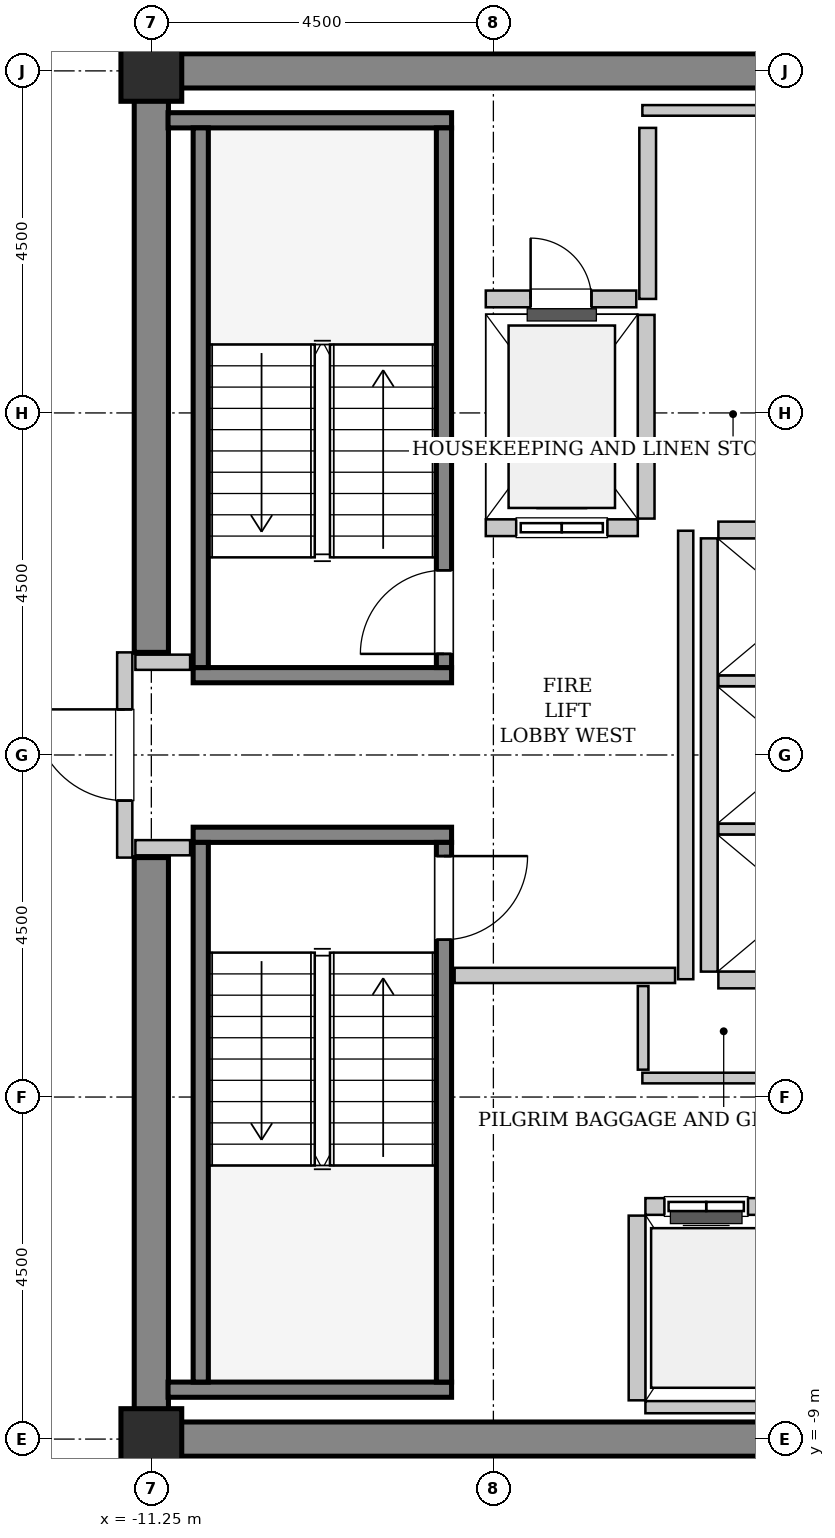
"""IFC4 building model, lengths in metres.
Left out: names, types, materials, properties, quantities, classifications, styles, units other than length and angle.
Written with IfcOpenShell. Run it as: python <this file> out.ifc"""

import sys

from ifc_helpers import new_model, si_unit, direction, frame, frame_2d, origin, origin_2d, place, context, subcontext, project, spatial, rectangle, hollow_rectangle, extrude, source, transform, mapped, element, fill, save


model = new_model("IFC4")
c1 = context("Model", 3, precision=1e-05, world=origin(), true_north=direction((0.0, 1.0)))
c2 = subcontext(c1, "Body", "Model", "MODEL_VIEW")
j1 = project(units=[si_unit("LENGTHUNIT", "METRE"), si_unit("PLANEANGLEUNIT", "RADIAN")], contexts=[c1])
p1 = place(None, origin())
s1 = spatial("IfcSite", under=j1, at=p1, CompositionType="ELEMENT")
p2 = place(p1, origin())
s2 = spatial("IfcBuilding", under=s1, at=p2, CompositionType="ELEMENT")
p3 = place(p2, frame((0.0, 0.0, 244.6)))
s3 = spatial("IfcBuildingStorey", under=s2, at=p3, CompositionType="ELEMENT", Elevation=244.6)
m1 = source(origin(), c2, "Body", "SweptSolid", [
    extrude(rectangle(XDim=9.925, YDim=0.45, at=frame_2d((4.962, 0.0))), origin(), (0.0, 0.0, 1.0), 3.8),
])
for number, where, z_axis, x_axis in (
    (1, (-11.475, 9.0, 0.0), (0.0, 0.0, 1.0), (1.0, 0.0, 0.0)),
    (2, (-11.475, -9.0, 0.0), (0.0, 0.0, 1.0), (1.0, 0.0, 0.0)),
):
    element("IfcWall", number, at=place(p3, frame(where, z_axis=z_axis, x_axis=x_axis)), inside=s3, PredefinedType="SHEAR", context=c2, shape_type="MappedRepresentation", body=[
        mapped(m1, transform((0.0, 0.0, 0.0), x_axis=(1.0, 0.0, 0.0), y_axis=(0.0, 1.0, 0.0), z_axis=(0.0, 0.0, 1.0), scale=1.0)),
    ])
m2 = source(origin(), c2, "Body", "SweptSolid", [
    extrude(rectangle(XDim=7.425, YDim=0.45, at=frame_2d((3.712, 0.0))), origin(), (0.0, 0.0, 1.0), 3.8),
])
for number, where, z_axis, x_axis in (
    (3, (-11.25, -8.775, 0.0), (0.0, 0.0, 1.0), (0.0, 1.0, 0.0)),
    (4, (-11.25, 1.35, 0.0), (0.0, 0.0, 1.0), (0.0, 1.0, 0.0)),
):
    element("IfcWall", number, at=place(p3, frame(where, z_axis=z_axis, x_axis=x_axis)), inside=s3, PredefinedType="SHEAR", context=c2, shape_type="MappedRepresentation", body=[
        mapped(m2, transform((0.0, 0.0, 0.0), x_axis=(1.0, 0.0, 0.0), y_axis=(0.0, 1.0, 0.0), z_axis=(0.0, 0.0, 1.0), scale=1.0)),
    ])
m3 = source(origin(), c2, "Body", "SweptSolid", [
    extrude(hollow_rectangle(XDim=0.8, YDim=0.8, WallThickness=0.04, InnerFilletRadius=0.04, OuterFilletRadius=0.08, at=origin_2d()), origin(), (0.0, 0.0, 1.0), 3.8),
])
for number, where, z_axis, x_axis in (
    (5, (-11.25, -9.0, 0.0), (0.0, 0.0, 1.0), (1.0, 0.0, 0.0)),
    (6, (-11.25, 9.0, 0.0), (0.0, 0.0, 1.0), (1.0, 0.0, 0.0)),
):
    element("IfcColumn", number, at=place(p3, frame(where, z_axis=z_axis, x_axis=x_axis)), inside=s3, PredefinedType="COLUMN", context=c2, shape_type="MappedRepresentation", body=[
        mapped(m3, transform((0.0, 0.0, 0.0), x_axis=(1.0, 0.0, 0.0), y_axis=(0.0, 1.0, 0.0), z_axis=(0.0, 0.0, 1.0), scale=1.0)),
    ])
m4 = source(origin(), c2, "Body", "SweptSolid", [
    extrude(rectangle(XDim=3.4, YDim=0.2, at=frame_2d((1.7, 0.0))), origin(), (0.0, 0.0, 1.0), 3.8),
])
p4 = place(p3, frame((-7.3, 1.05, 0.0), z_axis=(0.0, 0.0, 1.0), x_axis=(-1.0, 0.0, 0.0)))
e7 = element("IfcWall", 7, at=p4, inside=s3, PredefinedType="SOLIDWALL", context=c2, shape_type="MappedRepresentation", body=[
    mapped(m4, transform((0.0, 0.0, 0.0), x_axis=(1.0, 0.0, 0.0), y_axis=(0.0, 1.0, 0.0), z_axis=(0.0, 0.0, 1.0), scale=1.0)),
])
m5 = source(origin(), c2, "Body", "SweptSolid", [
    extrude(rectangle(XDim=3.73, YDim=0.2, at=frame_2d((1.865, 0.0))), origin(), (0.0, 0.0, 1.0), 3.8),
])
p5 = place(p3, frame((-7.3, 8.35, 0.0), z_axis=(0.0, 0.0, 1.0), x_axis=(-1.0, 0.0, 0.0)))
e8 = element("IfcWall", 8, at=p5, inside=s3, PredefinedType="SOLIDWALL", context=c2, shape_type="MappedRepresentation", body=[
    mapped(m5, transform((0.0, 0.0, 0.0), x_axis=(1.0, 0.0, 0.0), y_axis=(0.0, 1.0, 0.0), z_axis=(0.0, 0.0, 1.0), scale=1.0)),
])
m6 = source(origin(), c2, "Body", "SweptSolid", [
    extrude(rectangle(XDim=7.1, YDim=0.2, at=frame_2d((3.55, 0.0))), origin(), (0.0, 0.0, 1.0), 3.8),
])
p6 = place(p3, frame((-7.4, 1.15, 0.0), z_axis=(0.0, 0.0, 1.0), x_axis=(0.0, 1.0, 0.0)))
e9 = element("IfcWall", 9, at=p6, inside=s3, PredefinedType="SOLIDWALL", context=c2, shape_type="MappedRepresentation", body=[
    mapped(m6, transform((0.0, 0.0, 0.0), x_axis=(1.0, 0.0, 0.0), y_axis=(0.0, 1.0, 0.0), z_axis=(0.0, 0.0, 1.0), scale=1.0)),
])
p7 = place(p6, frame((0.18, 0.0, 0.0)))
e10 = element("IfcOpeningElement", 10, at=p7, cuts=e9, PredefinedType="OPENING", context=c2, shape_type="SweptSolid", body=[
    extrude(rectangle(XDim=1.1, YDim=2.15, at=frame_2d((0.55, 1.075))), frame((0.0, 0.11, 0.0), z_axis=(0.0, -1.0, 0.0), x_axis=(1.0, 0.0, 0.0)), (0.0, 0.0, 1.0), 0.22),
])
p8 = place(p3, frame((-10.6, 1.15, 0.0), z_axis=(0.0, 0.0, 1.0), x_axis=(0.0, 1.0, 0.0)))
e11 = element("IfcWall", 11, at=p8, inside=s3, PredefinedType="SOLIDWALL", context=c2, shape_type="MappedRepresentation", body=[
    mapped(m6, transform((0.0, 0.0, 0.0), x_axis=(1.0, 0.0, 0.0), y_axis=(0.0, 1.0, 0.0), z_axis=(0.0, 0.0, 1.0), scale=1.0)),
])
p9 = place(p3, frame((-10.7, -1.05, 0.0), z_axis=(0.0, 0.0, 1.0), x_axis=(1.0, 0.0, 0.0)))
e12 = element("IfcWall", 12, at=p9, inside=s3, PredefinedType="SOLIDWALL", context=c2, shape_type="MappedRepresentation", body=[
    mapped(m4, transform((0.0, 0.0, 0.0), x_axis=(1.0, 0.0, 0.0), y_axis=(0.0, 1.0, 0.0), z_axis=(0.0, 0.0, 1.0), scale=1.0)),
])
p10 = place(p3, frame((-11.03, -8.35, 0.0), z_axis=(0.0, 0.0, 1.0), x_axis=(1.0, 0.0, 0.0)))
e13 = element("IfcWall", 13, at=p10, inside=s3, PredefinedType="SOLIDWALL", context=c2, shape_type="MappedRepresentation", body=[
    mapped(m5, transform((0.0, 0.0, 0.0), x_axis=(1.0, 0.0, 0.0), y_axis=(0.0, 1.0, 0.0), z_axis=(0.0, 0.0, 1.0), scale=1.0)),
])
p11 = place(p3, frame((-10.6, -1.15, 0.0), z_axis=(0.0, 0.0, 1.0), x_axis=(0.0, -1.0, 0.0)))
e14 = element("IfcWall", 14, at=p11, inside=s3, PredefinedType="SOLIDWALL", context=c2, shape_type="MappedRepresentation", body=[
    mapped(m6, transform((0.0, 0.0, 0.0), x_axis=(1.0, 0.0, 0.0), y_axis=(0.0, 1.0, 0.0), z_axis=(0.0, 0.0, 1.0), scale=1.0)),
])
p12 = place(p3, frame((-7.4, -1.15, 0.0), z_axis=(0.0, 0.0, 1.0), x_axis=(0.0, -1.0, 0.0)))
e15 = element("IfcWall", 15, at=p12, inside=s3, PredefinedType="SOLIDWALL", context=c2, shape_type="MappedRepresentation", body=[
    mapped(m6, transform((0.0, 0.0, 0.0), x_axis=(1.0, 0.0, 0.0), y_axis=(0.0, 1.0, 0.0), z_axis=(0.0, 0.0, 1.0), scale=1.0)),
])
p13 = place(p12, frame((0.18, 0.0, 0.0)))
e16 = element("IfcOpeningElement", 16, at=p13, cuts=e15, PredefinedType="OPENING", context=c2, shape_type="SweptSolid", body=[
    extrude(rectangle(XDim=1.1, YDim=2.15, at=frame_2d((0.55, 1.075))), frame((0.0, 0.11, 0.0), z_axis=(0.0, -1.0, 0.0), x_axis=(1.0, 0.0, 0.0)), (0.0, 0.0, 1.0), 0.22),
])
m7 = source(origin(), c2, "Body", "SweptSolid", [
    extrude(rectangle(XDim=2.0, YDim=0.22, at=frame_2d((1.0, 0.0))), origin(), (0.0, 0.0, 1.0), 3.535),
])
p14 = place(p3, frame((-6.85, 2.99, 0.0), z_axis=(0.0, 0.0, 1.0), x_axis=(1.0, 0.0, 0.0)))
e17 = element("IfcWall", 17, at=p14, inside=s3, PredefinedType="SOLIDWALL", context=c2, shape_type="MappedRepresentation", body=[
    mapped(m7, transform((0.0, 0.0, 0.0), x_axis=(1.0, 0.0, 0.0), y_axis=(0.0, 1.0, 0.0), z_axis=(0.0, 0.0, 1.0), scale=1.0)),
])
p15 = place(p14, frame((0.4, 0.0, 0.0)))
e18 = element("IfcOpeningElement", 18, at=p15, cuts=e17, PredefinedType="OPENING", context=c2, shape_type="SweptSolid", body=[
    extrude(rectangle(XDim=1.2, YDim=2.2, at=frame_2d((0.6, 1.1))), frame((0.0, 0.12, 0.0), z_axis=(0.0, -1.0, 0.0), x_axis=(1.0, 0.0, 0.0)), (0.0, 0.0, 1.0), 0.24),
])
m8 = source(origin(), c2, "Body", "SweptSolid", [
    extrude(rectangle(XDim=2.68, YDim=0.22, at=frame_2d((1.34, 0.0))), origin(), (0.0, 0.0, 1.0), 3.535),
])
p16 = place(p3, frame((-4.74, 3.11, 0.0), z_axis=(0.0, 0.0, 1.0), x_axis=(0.0, 1.0, 0.0)))
e19 = element("IfcWall", 19, at=p16, inside=s3, PredefinedType="SOLIDWALL", context=c2, shape_type="MappedRepresentation", body=[
    mapped(m8, transform((0.0, 0.0, 0.0), x_axis=(1.0, 0.0, 0.0), y_axis=(0.0, 1.0, 0.0), z_axis=(0.0, 0.0, 1.0), scale=1.0)),
])
m9 = source(origin(), c2, "Body", "SweptSolid", [
    extrude(rectangle(XDim=3.2, YDim=0.22, at=frame_2d((1.6, 0.0))), origin(), (0.0, 0.0, 1.0), 3.535),
])
p17 = place(p3, frame((-1.55, -5.94, 0.0), z_axis=(0.0, 0.0, 1.0), x_axis=(-1.0, 0.0, 0.0)))
e20 = element("IfcWall", 20, at=p17, inside=s3, PredefinedType="SOLIDWALL", context=c2, shape_type="MappedRepresentation", body=[
    mapped(m9, transform((0.0, 0.0, 0.0), x_axis=(1.0, 0.0, 0.0), y_axis=(0.0, 1.0, 0.0), z_axis=(0.0, 0.0, 1.0), scale=1.0)),
])
p18 = place(p17, frame((1.85, 0.0, 0.0)))
e21 = element("IfcOpeningElement", 21, at=p18, cuts=e20, PredefinedType="OPENING", context=c2, shape_type="SweptSolid", body=[
    extrude(rectangle(XDim=1.1, YDim=2.2, at=frame_2d((0.55, 1.1))), frame((0.0, 0.12, 0.0), z_axis=(0.0, -1.0, 0.0), x_axis=(1.0, 0.0, 0.0)), (0.0, 0.0, 1.0), 0.24),
])
p19 = place(p17, frame((0.225, 0.0, 0.0)))
e22 = element("IfcOpeningElement", 22, at=p19, cuts=e20, PredefinedType="OPENING", context=c2, shape_type="SweptSolid", body=[
    extrude(rectangle(XDim=1.1, YDim=2.2, at=frame_2d((0.55, 1.1))), frame((0.0, 0.12, 0.0), z_axis=(0.0, -1.0, 0.0), x_axis=(1.0, 0.0, 0.0)), (0.0, 0.0, 1.0), 0.24),
])
m10 = source(origin(), c2, "Body", "SweptSolid", [
    extrude(rectangle(XDim=3.2, YDim=0.16, at=frame_2d((1.6, 0.0))), origin(), (0.0, 0.0, 1.0), 2.625),
])
p20 = place(p3, frame((-4.75, -8.58, 0.0), z_axis=(0.0, 0.0, 1.0), x_axis=(1.0, 0.0, 0.0)))
e23 = element("IfcWall", 23, at=p20, inside=s3, PredefinedType="PARTITIONING", context=c2, shape_type="MappedRepresentation", body=[
    mapped(m10, transform((0.0, 0.0, 0.0), x_axis=(1.0, 0.0, 0.0), y_axis=(0.0, 1.0, 0.0), z_axis=(0.0, 0.0, 1.0), scale=1.0)),
])
m11 = source(origin(), c2, "Body", "SweptSolid", [
    extrude(rectangle(XDim=2.43, YDim=0.22, at=frame_2d((1.215, 0.0))), origin(), (0.0, 0.0, 1.0), 3.535),
])
p21 = place(p3, frame((-4.86, -6.06, 0.0), z_axis=(0.0, 0.0, 1.0), x_axis=(0.0, -1.0, 0.0)))
e24 = element("IfcWall", 24, at=p21, inside=s3, PredefinedType="SOLIDWALL", context=c2, shape_type="MappedRepresentation", body=[
    mapped(m11, transform((0.0, 0.0, 0.0), x_axis=(1.0, 0.0, 0.0), y_axis=(0.0, 1.0, 0.0), z_axis=(0.0, 0.0, 1.0), scale=1.0)),
])
m12 = source(origin(), c2, "Body", "SweptSolid", [
    extrude(rectangle(XDim=5.7, YDim=0.22, at=frame_2d((2.85, 0.0))), origin(), (0.0, 0.0, 1.0), 3.535),
])
p22 = place(p3, frame((-3.91, 2.85, 0.0), z_axis=(0.0, 0.0, 1.0), x_axis=(0.0, -1.0, 0.0)))
e25 = element("IfcWall", 25, at=p22, inside=s3, PredefinedType="SOLIDWALL", context=c2, shape_type="MappedRepresentation", body=[
    mapped(m12, transform((0.0, 0.0, 0.0), x_axis=(1.0, 0.0, 0.0), y_axis=(0.0, 1.0, 0.0), z_axis=(0.0, 0.0, 1.0), scale=1.0)),
])
m13 = source(origin(), c2, "Body", "SweptSolid", [
    extrude(rectangle(XDim=2.13, YDim=0.22, at=frame_2d((1.065, 0.0))), origin(), (0.0, 0.0, 1.0), 3.535),
])
p23 = place(p3, frame((-3.79, -2.96, 0.0), z_axis=(0.0, 0.0, 1.0), x_axis=(1.0, 0.0, 0.0)))
e26 = element("IfcWall", 26, at=p23, inside=s3, PredefinedType="SOLIDWALL", context=c2, shape_type="MappedRepresentation", body=[
    mapped(m13, transform((0.0, 0.0, 0.0), x_axis=(1.0, 0.0, 0.0), y_axis=(0.0, 1.0, 0.0), z_axis=(0.0, 0.0, 1.0), scale=1.0)),
])
m14 = source(origin(), c2, "Body", "SweptSolid", [
    extrude(rectangle(XDim=2.13, YDim=0.14, at=frame_2d((1.065, 0.0))), origin(), (0.0, 0.0, 1.0), 3.535),
])
for number, where, z_axis, x_axis in (
    (27, (-3.79, -0.975, 0.0), (0.0, 0.0, 1.0), (1.0, 0.0, 0.0)),
    (28, (-3.79, 0.975, 0.0), (0.0, 0.0, 1.0), (1.0, 0.0, 0.0)),
):
    element("IfcWall", number, at=place(p3, frame(where, z_axis=z_axis, x_axis=x_axis)), inside=s3, PredefinedType="PARTITIONING", context=c2, shape_type="MappedRepresentation", body=[
        mapped(m14, transform((0.0, 0.0, 0.0), x_axis=(1.0, 0.0, 0.0), y_axis=(0.0, 1.0, 0.0), z_axis=(0.0, 0.0, 1.0), scale=1.0)),
    ])
p24 = place(p3, frame((-1.66, 2.96, 0.0), z_axis=(0.0, 0.0, 1.0), x_axis=(-1.0, 0.0, 0.0)))
e29 = element("IfcWall", 29, at=p24, inside=s3, PredefinedType="SOLIDWALL", context=c2, shape_type="MappedRepresentation", body=[
    mapped(m13, transform((0.0, 0.0, 0.0), x_axis=(1.0, 0.0, 0.0), y_axis=(0.0, 1.0, 0.0), z_axis=(0.0, 0.0, 1.0), scale=1.0)),
])
m15 = source(origin(), c2, "Body", "SweptSolid", [
    extrude(rectangle(XDim=2.25, YDim=0.22, at=frame_2d((1.125, 0.0))), origin(), (0.0, 0.0, 1.0), 3.535),
])
p25 = place(p3, frame((-4.72, 6.0, 0.0), z_axis=(0.0, 0.0, 1.0), x_axis=(0.0, 1.0, 0.0)))
e30 = element("IfcWall", 30, at=p25, inside=s3, PredefinedType="SOLIDWALL", context=c2, shape_type="MappedRepresentation", body=[
    mapped(m15, transform((0.0, 0.0, 0.0), x_axis=(1.0, 0.0, 0.0), y_axis=(0.0, 1.0, 0.0), z_axis=(0.0, 0.0, 1.0), scale=1.0)),
])
m16 = source(origin(), c2, "Body", "SweptSolid", [
    extrude(rectangle(XDim=1.98, YDim=0.22, at=frame_2d((0.99, 0.0))), origin(), (0.0, 0.0, 1.0), 3.535),
])
p26 = place(p3, frame((-6.85, 6.0, 0.0), z_axis=(0.0, 0.0, 1.0), x_axis=(1.0, 0.0, 0.0)))
e31 = element("IfcWall", 31, at=p26, inside=s3, PredefinedType="SOLIDWALL", context=c2, shape_type="MappedRepresentation", body=[
    mapped(m16, transform((0.0, 0.0, 0.0), x_axis=(1.0, 0.0, 0.0), y_axis=(0.0, 1.0, 0.0), z_axis=(0.0, 0.0, 1.0), scale=1.0)),
])
p27 = place(p26, frame((0.59, 0.0, 0.0)))
e32 = element("IfcOpeningElement", 32, at=p27, cuts=e31, PredefinedType="OPENING", context=c2, shape_type="SweptSolid", body=[
    extrude(rectangle(XDim=0.8, YDim=2.0, at=frame_2d((0.4, 1.0))), frame((0.0, 0.12, 0.0), z_axis=(0.0, -1.0, 0.0), x_axis=(1.0, 0.0, 0.0)), (0.0, 0.0, 1.0), 0.24),
])
m17 = source(origin(), c2, "Body", "SweptSolid", [
    extrude(rectangle(XDim=2.7, YDim=0.2, at=frame_2d((1.35, 0.0))), origin(), (0.0, 0.0, 1.0), 2.625),
])
p28 = place(p3, frame((-11.6, -1.35, 0.0), z_axis=(0.0, 0.0, 1.0), x_axis=(0.0, 1.0, 0.0)))
e33 = element("IfcWall", 33, at=p28, inside=s3, PredefinedType="PARTITIONING", context=c2, shape_type="MappedRepresentation", body=[
    mapped(m17, transform((0.0, 0.0, 0.0), x_axis=(1.0, 0.0, 0.0), y_axis=(0.0, 1.0, 0.0), z_axis=(0.0, 0.0, 1.0), scale=1.0)),
])
p29 = place(p28, frame((0.75, 0.0, 0.0)))
e34 = element("IfcOpeningElement", 34, at=p29, cuts=e33, PredefinedType="OPENING", context=c2, shape_type="SweptSolid", body=[
    extrude(rectangle(XDim=1.2, YDim=2.15, at=frame_2d((0.6, 1.075))), frame((0.0, 0.11, 0.0), z_axis=(0.0, -1.0, 0.0), x_axis=(1.0, 0.0, 0.0)), (0.0, 0.0, 1.0), 0.22),
])
m18 = source(origin(), c2, "Body", "SweptSolid", [
    extrude(rectangle(XDim=5.9, YDim=0.2, at=frame_2d((2.95, 0.0))), origin(), (0.0, 0.0, 1.0), 3.535),
])
p30 = place(p3, frame((-4.22, -2.95, 0.0), z_axis=(0.0, 0.0, 1.0), x_axis=(0.0, 1.0, 0.0)))
e35 = element("IfcWall", 35, at=p30, inside=s3, PredefinedType="PARTITIONING", context=c2, shape_type="MappedRepresentation", body=[
    mapped(m18, transform((0.0, 0.0, 0.0), x_axis=(1.0, 0.0, 0.0), y_axis=(0.0, 1.0, 0.0), z_axis=(0.0, 0.0, 1.0), scale=1.0)),
])
m19 = source(origin(), c2, "Body", "SweptSolid", [
    extrude(rectangle(XDim=2.9, YDim=0.2, at=frame_2d((1.45, 0.0))), origin(), (0.0, 0.0, 1.0), 3.535),
])
p31 = place(p3, frame((-7.26, -2.9, 0.0), z_axis=(0.0, 0.0, 1.0), x_axis=(1.0, 0.0, 0.0)))
e36 = element("IfcWall", 36, at=p31, inside=s3, PredefinedType="PARTITIONING", context=c2, shape_type="MappedRepresentation", body=[
    mapped(m19, transform((0.0, 0.0, 0.0), x_axis=(1.0, 0.0, 0.0), y_axis=(0.0, 1.0, 0.0), z_axis=(0.0, 0.0, 1.0), scale=1.0)),
])
m20 = source(origin(), c2, "Body", "SweptSolid", [
    extrude(rectangle(XDim=0.72, YDim=0.2, at=frame_2d((0.36, 0.0))), origin(), (0.0, 0.0, 1.0), 3.535),
])
for number, where, z_axis, x_axis in (
    (37, (-11.46, 1.22, 0.0), (0.0, 0.0, 1.0), (1.0, 0.0, 0.0)),
    (38, (-11.46, -1.22, 0.0), (0.0, 0.0, 1.0), (1.0, 0.0, 0.0)),
):
    element("IfcWall", number, at=place(p3, frame(where, z_axis=z_axis, x_axis=x_axis)), inside=s3, PredefinedType="PARTITIONING", context=c2, shape_type="MappedRepresentation", body=[
        mapped(m20, transform((0.0, 0.0, 0.0), x_axis=(1.0, 0.0, 0.0), y_axis=(0.0, 1.0, 0.0), z_axis=(0.0, 0.0, 1.0), scale=1.0)),
    ])
m21 = source(origin(), c2, "Body", "SweptSolid", [
    extrude(rectangle(XDim=3.15, YDim=0.14, at=frame_2d((1.575, 0.0))), origin(), (0.0, 0.0, 1.0), 3.535),
])
for number, where, z_axis, x_axis in (
    (39, (-4.79, 8.48, 0.0), (0.0, 0.0, 1.0), (1.0, 0.0, 0.0)),
    (40, (-4.79, -4.25, 0.0), (0.0, 0.0, 1.0), (1.0, 0.0, 0.0)),
):
    element("IfcWall", number, at=place(p3, frame(where, z_axis=z_axis, x_axis=x_axis)), inside=s3, PredefinedType="PARTITIONING", context=c2, shape_type="MappedRepresentation", body=[
        mapped(m21, transform((0.0, 0.0, 0.0), x_axis=(1.0, 0.0, 0.0), y_axis=(0.0, 1.0, 0.0), z_axis=(0.0, 0.0, 1.0), scale=1.0)),
    ])
m22 = source(origin(), c2, "Body", "SweptSolid", [
    extrude(rectangle(XDim=1.1, YDim=0.14, at=frame_2d((0.55, 0.0))), origin(), (0.0, 0.0, 1.0), 3.535),
])
p32 = place(p3, frame((-4.78, -4.14, 0.0), z_axis=(0.0, 0.0, 1.0), x_axis=(0.0, 1.0, 0.0)))
e41 = element("IfcWall", 41, at=p32, inside=s3, PredefinedType="PARTITIONING", context=c2, shape_type="MappedRepresentation", body=[
    mapped(m22, transform((0.0, 0.0, 0.0), x_axis=(1.0, 0.0, 0.0), y_axis=(0.0, 1.0, 0.0), z_axis=(0.0, 0.0, 1.0), scale=1.0)),
])
m23 = source(origin(), c2, "Body", "SweptSolid", [
    extrude(rectangle(XDim=1.1, YDim=2.15, at=frame_2d((0.55, 1.075))), frame((0.0, 0.025, 0.0), z_axis=(0.0, -1.0, 0.0), x_axis=(1.0, 0.0, 0.0)), (0.0, 0.0, 1.0), 0.05),
])
p33 = place(p7, origin())
e42 = element("IfcDoor", 42, at=p33, inside=s3, OperationType="SINGLE_SWING_LEFT", PredefinedType="DOOR", context=c2, shape_type="MappedRepresentation", body=[
    mapped(m23, transform((0.0, 0.0, 0.0), x_axis=(1.0, 0.0, 0.0), y_axis=(0.0, 1.0, 0.0), z_axis=(0.0, 0.0, 1.0), scale=1.0)),
])
fill(e10, e42)
p34 = place(p13, origin())
e43 = element("IfcDoor", 43, at=p34, inside=s3, OperationType="SINGLE_SWING_LEFT", PredefinedType="DOOR", context=c2, shape_type="MappedRepresentation", body=[
    mapped(m23, transform((0.0, 0.0, 0.0), x_axis=(1.0, 0.0, 0.0), y_axis=(0.0, 1.0, 0.0), z_axis=(0.0, 0.0, 1.0), scale=1.0)),
])
fill(e16, e43)
m24 = source(origin(), c2, "Body", "SweptSolid", [
    extrude(rectangle(XDim=1.2, YDim=2.2, at=frame_2d((0.6, 1.1))), frame((0.0, 0.025, 0.0), z_axis=(0.0, -1.0, 0.0), x_axis=(1.0, 0.0, 0.0)), (0.0, 0.0, 1.0), 0.05),
])
p35 = place(p15, origin())
e44 = element("IfcDoor", 44, at=p35, inside=s3, OperationType="SLIDING_TO_LEFT", PredefinedType="DOOR", context=c2, shape_type="MappedRepresentation", body=[
    mapped(m24, transform((0.0, 0.0, 0.0), x_axis=(1.0, 0.0, 0.0), y_axis=(0.0, 1.0, 0.0), z_axis=(0.0, 0.0, 1.0), scale=1.0)),
])
fill(e18, e44)
m25 = source(origin(), c2, "Body", "SweptSolid", [
    extrude(rectangle(XDim=1.1, YDim=2.2, at=frame_2d((0.55, 1.1))), frame((0.0, 0.025, 0.0), z_axis=(0.0, -1.0, 0.0), x_axis=(1.0, 0.0, 0.0)), (0.0, 0.0, 1.0), 0.05),
])
p36 = place(p18, origin())
e45 = element("IfcDoor", 45, at=p36, inside=s3, OperationType="DOUBLE_DOOR_SLIDING", PredefinedType="DOOR", context=c2, shape_type="MappedRepresentation", body=[
    mapped(m25, transform((0.0, 0.0, 0.0), x_axis=(1.0, 0.0, 0.0), y_axis=(0.0, 1.0, 0.0), z_axis=(0.0, 0.0, 1.0), scale=1.0)),
])
fill(e21, e45)
m26 = source(origin(), c2, "Body", "SweptSolid", [
    extrude(rectangle(XDim=0.8, YDim=2.0, at=frame_2d((0.4, 1.0))), frame((0.0, 0.025, 0.0), z_axis=(0.0, -1.0, 0.0), x_axis=(1.0, 0.0, 0.0)), (0.0, 0.0, 1.0), 0.05),
])
p37 = place(p27, origin())
e46 = element("IfcDoor", 46, at=p37, inside=s3, OperationType="SINGLE_SWING_LEFT", PredefinedType="TRAPDOOR", context=c2, shape_type="MappedRepresentation", body=[
    mapped(m26, transform((0.0, 0.0, 0.0), x_axis=(1.0, 0.0, 0.0), y_axis=(0.0, 1.0, 0.0), z_axis=(0.0, 0.0, 1.0), scale=1.0)),
])
fill(e32, e46)
m27 = source(origin(), c2, "Body", "SweptSolid", [
    extrude(rectangle(XDim=1.2, YDim=2.15, at=frame_2d((0.6, 1.075))), frame((0.0, 0.025, 0.0), z_axis=(0.0, -1.0, 0.0), x_axis=(1.0, 0.0, 0.0)), (0.0, 0.0, 1.0), 0.05),
])
p38 = place(p29, origin())
e47 = element("IfcDoor", 47, at=p38, inside=s3, OperationType="SINGLE_SWING_RIGHT", PredefinedType="DOOR", context=c2, shape_type="MappedRepresentation", body=[
    mapped(m27, transform((0.0, 0.0, 0.0), x_axis=(1.0, 0.0, 0.0), y_axis=(0.0, 1.0, 0.0), z_axis=(0.0, 0.0, 1.0), scale=1.0)),
])
fill(e34, e47)
save(model, sys.argv[1])
